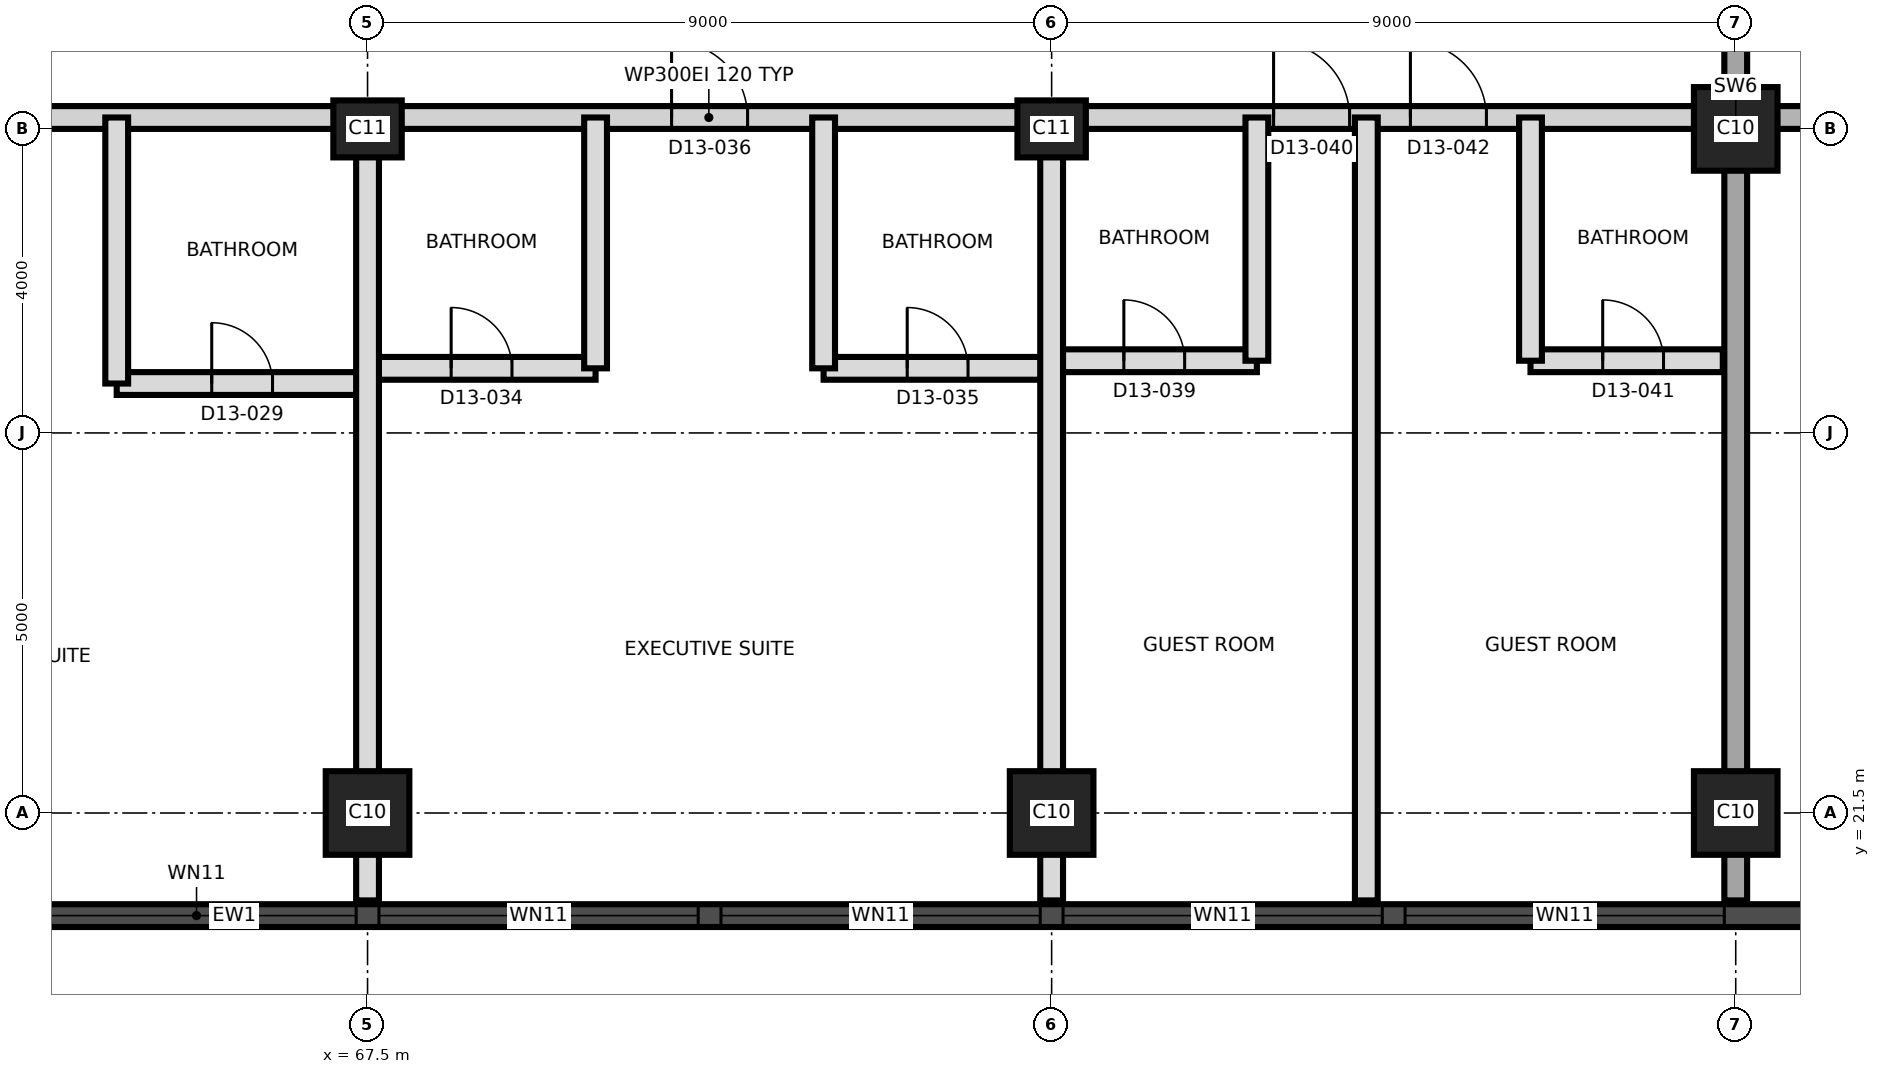
"""IFC4 building model, lengths in metres.
Left out: names, types, materials, properties, quantities, classifications, styles, units other than length and angle.
Written with IfcOpenShell. Run it as: python <this file> out.ifc"""

import sys

from ifc_helpers import new_model, si_unit, direction, frame, frame_2d, origin, origin_2d, place, context, subcontext, project, spatial, rectangle, extrude, element, fill, save


model = new_model("IFC4")
c1 = context("Model", 3, precision=1e-05, world=origin(), true_north=direction((0.0, 1.0)))
c2 = subcontext(c1, "Body", "Model", "MODEL_VIEW")
j1 = project(units=[si_unit("LENGTHUNIT", "METRE"), si_unit("PLANEANGLEUNIT", "RADIAN")], contexts=[c1])
p1 = place(None, origin())
s1 = spatial("IfcSite", under=j1, at=p1, CompositionType="ELEMENT")
p2 = place(p1, origin())
s2 = spatial("IfcBuilding", under=s1, at=p2, CompositionType="ELEMENT")
p3 = place(p2, frame((0.0, 0.0, 142.2)))
s3 = spatial("IfcBuildingStorey", under=s2, at=p3, CompositionType="ELEMENT", Elevation=142.2)
for number, where, z_axis, x_axis in (
    (1, (67.5, 21.5, 0.0), (0.0, 0.0, 1.0), (1.0, 0.0, 0.0)),
    (2, (76.5, 21.5, 0.0), (0.0, 0.0, 1.0), (1.0, 0.0, 0.0)),
    (3, (85.5, 21.5, 0.0), (0.0, 0.0, 1.0), (1.0, 0.0, 0.0)),
):
    element("IfcColumn", number, at=place(p3, frame(where, z_axis=z_axis, x_axis=x_axis)), inside=s3, PredefinedType="COLUMN", context=c2, shape_type="SweptSolid", body=[
        extrude(rectangle(XDim=1.1, YDim=1.1, at=origin_2d()), origin(), (0.0, 0.0, 1.0), 3.7),
    ])
for number, where, z_axis, x_axis in (
    (4, (67.5, 30.5, 0.0), (0.0, 0.0, 1.0), (1.0, 0.0, 0.0)),
    (5, (76.5, 30.5, 0.0), (0.0, 0.0, 1.0), (1.0, 0.0, 0.0)),
):
    element("IfcColumn", number, at=place(p3, frame(where, z_axis=z_axis, x_axis=x_axis)), inside=s3, PredefinedType="COLUMN", context=c2, shape_type="SweptSolid", body=[
        extrude(rectangle(XDim=0.9, YDim=0.75, at=origin_2d()), origin(), (0.0, 0.0, 1.0), 3.7),
    ])
p4 = place(p3, frame((85.5, 30.5, 0.0), z_axis=(0.0, 0.0, 1.0), x_axis=(1.0, 0.0, 0.0)))
e6 = element("IfcColumn", 6, at=p4, inside=s3, PredefinedType="COLUMN", context=c2, shape_type="SweptSolid", body=[
    extrude(rectangle(XDim=1.1, YDim=1.1, at=origin_2d()), origin(), (0.0, 0.0, 1.0), 3.7),
])
p5 = place(p3, frame((85.5, 20.35, 0.0), z_axis=(0.0, 0.0, 1.0), x_axis=(0.0, 1.0, 0.0)))
e7 = element("IfcWall", 7, at=p5, inside=s3, PredefinedType="SHEAR", context=c2, shape_type="SweptSolid", body=[
    extrude(rectangle(XDim=20.3, YDim=0.3, at=frame_2d((10.15, 0.0))), origin(), (0.0, 0.0, 1.0), 3.7),
])
p6 = place(p5, frame((11.35, 0.0, 0.0)))
e8 = element("IfcOpeningElement", 8, at=p6, cuts=e7, PredefinedType="OPENING", context=c2, shape_type="SweptSolid", body=[
    extrude(rectangle(XDim=1.4, YDim=2.1, at=frame_2d((0.7, 1.05))), frame((0.0, 0.16, 0.0), z_axis=(0.0, -1.0, 0.0), x_axis=(1.0, 0.0, 0.0)), (0.0, 0.0, 1.0), 0.32),
])
p7 = place(p3, frame((44.011, 20.15, 0.0), z_axis=(0.0, 0.0, 1.0), x_axis=(1.0, 0.0, 0.0)))
e9 = element("IfcWall", 9, at=p7, inside=s3, PredefinedType="SOLIDWALL", context=c2, shape_type="SweptSolid", body=[
    extrude(rectangle(XDim=43.476, YDim=0.3, at=frame_2d((21.738, 0.0))), origin(), (0.0, 0.0, 1.0), 3.4),
])
p8 = place(p7, frame((1.845, 0.0, 0.3)))
e10 = element("IfcOpeningElement", 10, at=p8, cuts=e9, PredefinedType="OPENING", context=c2, shape_type="SweptSolid", body=[
    extrude(rectangle(XDim=1.8, YDim=2.4, at=frame_2d((0.9, 1.2))), frame((0.0, 0.16, 0.0), z_axis=(0.0, -1.0, 0.0), x_axis=(1.0, 0.0, 0.0)), (0.0, 0.0, 1.0), 0.32),
])
p9 = place(p7, frame((5.639, 0.0, 0.9)))
e11 = element("IfcOpeningElement", 11, at=p9, cuts=e9, PredefinedType="OPENING", context=c2, shape_type="SweptSolid", body=[
    extrude(rectangle(XDim=4.2, YDim=1.5, at=frame_2d((2.1, 0.75))), frame((0.0, 0.16, 0.0), z_axis=(0.0, -1.0, 0.0), x_axis=(1.0, 0.0, 0.0)), (0.0, 0.0, 1.0), 0.32),
])
p10 = place(p7, frame((10.139, 0.0, 0.9)))
e12 = element("IfcOpeningElement", 12, at=p10, cuts=e9, PredefinedType="OPENING", context=c2, shape_type="SweptSolid", body=[
    extrude(rectangle(XDim=4.2, YDim=1.5, at=frame_2d((2.1, 0.75))), frame((0.0, 0.16, 0.0), z_axis=(0.0, -1.0, 0.0), x_axis=(1.0, 0.0, 0.0)), (0.0, 0.0, 1.0), 0.32),
])
p11 = place(p7, frame((14.639, 0.0, 0.9)))
e13 = element("IfcOpeningElement", 13, at=p11, cuts=e9, PredefinedType="OPENING", context=c2, shape_type="SweptSolid", body=[
    extrude(rectangle(XDim=4.2, YDim=1.5, at=frame_2d((2.1, 0.75))), frame((0.0, 0.16, 0.0), z_axis=(0.0, -1.0, 0.0), x_axis=(1.0, 0.0, 0.0)), (0.0, 0.0, 1.0), 0.32),
])
p12 = place(p7, frame((19.139, 0.0, 0.9)))
e14 = element("IfcOpeningElement", 14, at=p12, cuts=e9, PredefinedType="OPENING", context=c2, shape_type="SweptSolid", body=[
    extrude(rectangle(XDim=4.2, YDim=1.5, at=frame_2d((2.1, 0.75))), frame((0.0, 0.16, 0.0), z_axis=(0.0, -1.0, 0.0), x_axis=(1.0, 0.0, 0.0)), (0.0, 0.0, 1.0), 0.32),
])
p13 = place(p7, frame((23.639, 0.0, 0.9)))
e15 = element("IfcOpeningElement", 15, at=p13, cuts=e9, PredefinedType="OPENING", context=c2, shape_type="SweptSolid", body=[
    extrude(rectangle(XDim=4.2, YDim=1.5, at=frame_2d((2.1, 0.75))), frame((0.0, 0.16, 0.0), z_axis=(0.0, -1.0, 0.0), x_axis=(1.0, 0.0, 0.0)), (0.0, 0.0, 1.0), 0.32),
])
p14 = place(p7, frame((28.139, 0.0, 0.9)))
e16 = element("IfcOpeningElement", 16, at=p14, cuts=e9, PredefinedType="OPENING", context=c2, shape_type="SweptSolid", body=[
    extrude(rectangle(XDim=4.2, YDim=1.5, at=frame_2d((2.1, 0.75))), frame((0.0, 0.16, 0.0), z_axis=(0.0, -1.0, 0.0), x_axis=(1.0, 0.0, 0.0)), (0.0, 0.0, 1.0), 0.32),
])
p15 = place(p7, frame((32.639, 0.0, 0.9)))
e17 = element("IfcOpeningElement", 17, at=p15, cuts=e9, PredefinedType="OPENING", context=c2, shape_type="SweptSolid", body=[
    extrude(rectangle(XDim=4.2, YDim=1.5, at=frame_2d((2.1, 0.75))), frame((0.0, 0.16, 0.0), z_axis=(0.0, -1.0, 0.0), x_axis=(1.0, 0.0, 0.0)), (0.0, 0.0, 1.0), 0.32),
])
p16 = place(p7, frame((37.139, 0.0, 0.9)))
e18 = element("IfcOpeningElement", 18, at=p16, cuts=e9, PredefinedType="OPENING", context=c2, shape_type="SweptSolid", body=[
    extrude(rectangle(XDim=4.2, YDim=1.5, at=frame_2d((2.1, 0.75))), frame((0.0, 0.16, 0.0), z_axis=(0.0, -1.0, 0.0), x_axis=(1.0, 0.0, 0.0)), (0.0, 0.0, 1.0), 0.32),
])
p17 = place(p3, frame((64.2, 27.15, 0.0), z_axis=(0.0, 0.0, 1.0), x_axis=(1.0, 0.0, 0.0)))
e19 = element("IfcWall", 19, at=p17, inside=s3, PredefinedType="PARTITIONING", context=c2, shape_type="SweptSolid", body=[
    extrude(rectangle(XDim=3.3, YDim=0.3, at=frame_2d((1.65, 0.0))), origin(), (0.0, 0.0, 1.0), 3.4),
])
p18 = place(p17, frame((1.25, 0.0, 0.0)))
e20 = element("IfcOpeningElement", 20, at=p18, cuts=e19, PredefinedType="OPENING", context=c2, shape_type="SweptSolid", body=[
    extrude(rectangle(XDim=0.8, YDim=2.1, at=frame_2d((0.4, 1.05))), frame((0.0, 0.16, 0.0), z_axis=(0.0, -1.0, 0.0), x_axis=(1.0, 0.0, 0.0)), (0.0, 0.0, 1.0), 0.32),
])
p19 = place(p3, frame((67.5, 27.35, 0.0), z_axis=(0.0, 0.0, 1.0), x_axis=(1.0, 0.0, 0.0)))
e21 = element("IfcWall", 21, at=p19, inside=s3, PredefinedType="PARTITIONING", context=c2, shape_type="SweptSolid", body=[
    extrude(rectangle(XDim=3.0, YDim=0.3, at=frame_2d((1.5, 0.0))), origin(), (0.0, 0.0, 1.0), 3.4),
])
p20 = place(p19, frame((1.1, 0.0, 0.0)))
e22 = element("IfcOpeningElement", 22, at=p20, cuts=e21, PredefinedType="OPENING", context=c2, shape_type="SweptSolid", body=[
    extrude(rectangle(XDim=0.8, YDim=2.1, at=frame_2d((0.4, 1.05))), frame((0.0, 0.16, 0.0), z_axis=(0.0, -1.0, 0.0), x_axis=(1.0, 0.0, 0.0)), (0.0, 0.0, 1.0), 0.32),
])
p21 = place(p3, frame((73.5, 27.35, 0.0), z_axis=(0.0, 0.0, 1.0), x_axis=(1.0, 0.0, 0.0)))
e23 = element("IfcWall", 23, at=p21, inside=s3, PredefinedType="PARTITIONING", context=c2, shape_type="SweptSolid", body=[
    extrude(rectangle(XDim=3.0, YDim=0.3, at=frame_2d((1.5, 0.0))), origin(), (0.0, 0.0, 1.0), 3.4),
])
p22 = place(p21, frame((1.1, 0.0, 0.0)))
e24 = element("IfcOpeningElement", 24, at=p22, cuts=e23, PredefinedType="OPENING", context=c2, shape_type="SweptSolid", body=[
    extrude(rectangle(XDim=0.8, YDim=2.1, at=frame_2d((0.4, 1.05))), frame((0.0, 0.16, 0.0), z_axis=(0.0, -1.0, 0.0), x_axis=(1.0, 0.0, 0.0)), (0.0, 0.0, 1.0), 0.32),
])
p23 = place(p3, frame((76.5, 27.45, 0.0), z_axis=(0.0, 0.0, 1.0), x_axis=(1.0, 0.0, 0.0)))
e25 = element("IfcWall", 25, at=p23, inside=s3, PredefinedType="PARTITIONING", context=c2, shape_type="SweptSolid", body=[
    extrude(rectangle(XDim=2.7, YDim=0.3, at=frame_2d((1.35, 0.0))), origin(), (0.0, 0.0, 1.0), 3.4),
])
p24 = place(p23, frame((0.95, 0.0, 0.0)))
e26 = element("IfcOpeningElement", 26, at=p24, cuts=e25, PredefinedType="OPENING", context=c2, shape_type="SweptSolid", body=[
    extrude(rectangle(XDim=0.8, YDim=2.1, at=frame_2d((0.4, 1.05))), frame((0.0, 0.16, 0.0), z_axis=(0.0, -1.0, 0.0), x_axis=(1.0, 0.0, 0.0)), (0.0, 0.0, 1.0), 0.32),
])
p25 = place(p3, frame((82.8, 27.45, 0.0), z_axis=(0.0, 0.0, 1.0), x_axis=(1.0, 0.0, 0.0)))
e27 = element("IfcWall", 27, at=p25, inside=s3, PredefinedType="PARTITIONING", context=c2, shape_type="SweptSolid", body=[
    extrude(rectangle(XDim=2.53, YDim=0.3, at=frame_2d((1.265, 0.0))), origin(), (0.0, 0.0, 1.0), 3.4),
])
p26 = place(p25, frame((0.95, 0.0, 0.0)))
e28 = element("IfcOpeningElement", 28, at=p26, cuts=e27, PredefinedType="OPENING", context=c2, shape_type="SweptSolid", body=[
    extrude(rectangle(XDim=0.8, YDim=2.1, at=frame_2d((0.4, 1.05))), frame((0.0, 0.16, 0.0), z_axis=(0.0, -1.0, 0.0), x_axis=(1.0, 0.0, 0.0)), (0.0, 0.0, 1.0), 0.32),
])
p27 = place(p3, frame((58.65, 30.65, 0.0), z_axis=(0.0, 0.0, 1.0), x_axis=(1.0, 0.0, 0.0)))
e29 = element("IfcWall", 29, at=p27, inside=s3, PredefinedType="PARTITIONING", context=c2, shape_type="SweptSolid", body=[
    extrude(rectangle(XDim=26.68, YDim=0.3, at=frame_2d((13.34, 0.0))), origin(), (0.0, 0.0, 1.0), 3.4),
])
p28 = place(p27, frame((2.2, 0.0, 0.0)))
e30 = element("IfcOpeningElement", 30, at=p28, cuts=e29, PredefinedType="OPENING", context=c2, shape_type="SweptSolid", body=[
    extrude(rectangle(XDim=1.0, YDim=2.4, at=frame_2d((0.5, 1.2))), frame((0.0, 0.16, 0.0), z_axis=(0.0, -1.0, 0.0), x_axis=(1.0, 0.0, 0.0)), (0.0, 0.0, 1.0), 0.32),
])
p29 = place(p27, frame((12.85, 0.0, 0.0)))
e31 = element("IfcOpeningElement", 31, at=p29, cuts=e29, PredefinedType="OPENING", context=c2, shape_type="SweptSolid", body=[
    extrude(rectangle(XDim=1.0, YDim=2.4, at=frame_2d((0.5, 1.2))), frame((0.0, 0.16, 0.0), z_axis=(0.0, -1.0, 0.0), x_axis=(1.0, 0.0, 0.0)), (0.0, 0.0, 1.0), 0.32),
])
p30 = place(p27, frame((20.77, 0.0, 0.0)))
e32 = element("IfcOpeningElement", 32, at=p30, cuts=e29, PredefinedType="OPENING", context=c2, shape_type="SweptSolid", body=[
    extrude(rectangle(XDim=1.0, YDim=2.1, at=frame_2d((0.5, 1.05))), frame((0.0, 0.16, 0.0), z_axis=(0.0, -1.0, 0.0), x_axis=(1.0, 0.0, 0.0)), (0.0, 0.0, 1.0), 0.32),
])
p31 = place(p27, frame((22.57, 0.0, 0.0)))
e33 = element("IfcOpeningElement", 33, at=p31, cuts=e29, PredefinedType="OPENING", context=c2, shape_type="SweptSolid", body=[
    extrude(rectangle(XDim=1.0, YDim=2.1, at=frame_2d((0.5, 1.05))), frame((0.0, 0.16, 0.0), z_axis=(0.0, -1.0, 0.0), x_axis=(1.0, 0.0, 0.0)), (0.0, 0.0, 1.0), 0.32),
])
p32 = place(p3, frame((85.67, 30.65, 0.0), z_axis=(0.0, 0.0, 1.0), x_axis=(1.0, 0.0, 0.0)))
e34 = element("IfcWall", 34, at=p32, inside=s3, PredefinedType="SHEAR", context=c2, shape_type="SweptSolid", body=[
    extrude(rectangle(XDim=9.58, YDim=0.3, at=frame_2d((4.79, 0.0))), origin(), (0.0, 0.0, 1.0), 3.4),
])
p33 = place(p32, frame((2.08, 0.0, 0.0)))
e35 = element("IfcOpeningElement", 35, at=p33, cuts=e34, PredefinedType="OPENING", context=c2, shape_type="SweptSolid", body=[
    extrude(rectangle(XDim=1.2, YDim=2.1, at=frame_2d((0.6, 1.05))), frame((0.0, 0.16, 0.0), z_axis=(0.0, -1.0, 0.0), x_axis=(1.0, 0.0, 0.0)), (0.0, 0.0, 1.0), 0.32),
])
p34 = place(p32, frame((5.63, 0.0, 0.0)))
e36 = element("IfcOpeningElement", 36, at=p34, cuts=e34, PredefinedType="OPENING", context=c2, shape_type="SweptSolid", body=[
    extrude(rectangle(XDim=1.0, YDim=2.1, at=frame_2d((0.5, 1.05))), frame((0.0, 0.16, 0.0), z_axis=(0.0, -1.0, 0.0), x_axis=(1.0, 0.0, 0.0)), (0.0, 0.0, 1.0), 0.32),
])
p35 = place(p3, frame((64.2, 27.15, 0.0), z_axis=(0.0, 0.0, 1.0), x_axis=(0.0, 1.0, 0.0)))
e37 = element("IfcWall", 37, at=p35, inside=s3, PredefinedType="PARTITIONING", context=c2, shape_type="SweptSolid", body=[
    extrude(rectangle(XDim=3.5, YDim=0.3, at=frame_2d((1.75, 0.0))), origin(), (0.0, 0.0, 1.0), 3.4),
])
p36 = place(p3, frame((67.5, 20.35, 0.0), z_axis=(0.0, 0.0, 1.0), x_axis=(0.0, 1.0, 0.0)))
e38 = element("IfcWall", 38, at=p36, inside=s3, PredefinedType="PARTITIONING", context=c2, shape_type="SweptSolid", body=[
    extrude(rectangle(XDim=10.3, YDim=0.3, at=frame_2d((5.15, 0.0))), origin(), (0.0, 0.0, 1.0), 3.4),
])
for number, where, z_axis, x_axis in (
    (39, (70.5, 27.35, 0.0), (0.0, 0.0, 1.0), (0.0, 1.0, 0.0)),
    (40, (73.5, 27.35, 0.0), (0.0, 0.0, 1.0), (0.0, 1.0, 0.0)),
):
    element("IfcWall", number, at=place(p3, frame(where, z_axis=z_axis, x_axis=x_axis)), inside=s3, PredefinedType="PARTITIONING", context=c2, shape_type="SweptSolid", body=[
        extrude(rectangle(XDim=3.3, YDim=0.3, at=frame_2d((1.65, 0.0))), origin(), (0.0, 0.0, 1.0), 3.4),
    ])
p37 = place(p3, frame((76.5, 20.35, 0.0), z_axis=(0.0, 0.0, 1.0), x_axis=(0.0, 1.0, 0.0)))
e41 = element("IfcWall", 41, at=p37, inside=s3, PredefinedType="PARTITIONING", context=c2, shape_type="SweptSolid", body=[
    extrude(rectangle(XDim=10.3, YDim=0.3, at=frame_2d((5.15, 0.0))), origin(), (0.0, 0.0, 1.0), 3.4),
])
p38 = place(p3, frame((79.2, 27.45, 0.0), z_axis=(0.0, 0.0, 1.0), x_axis=(0.0, 1.0, 0.0)))
e42 = element("IfcWall", 42, at=p38, inside=s3, PredefinedType="PARTITIONING", context=c2, shape_type="SweptSolid", body=[
    extrude(rectangle(XDim=3.2, YDim=0.3, at=frame_2d((1.6, 0.0))), origin(), (0.0, 0.0, 1.0), 3.4),
])
p39 = place(p3, frame((80.64, 20.35, 0.0), z_axis=(0.0, 0.0, 1.0), x_axis=(0.0, 1.0, 0.0)))
e43 = element("IfcWall", 43, at=p39, inside=s3, PredefinedType="PARTITIONING", context=c2, shape_type="SweptSolid", body=[
    extrude(rectangle(XDim=10.3, YDim=0.3, at=frame_2d((5.15, 0.0))), origin(), (0.0, 0.0, 1.0), 3.4),
])
p40 = place(p3, frame((82.8, 27.45, 0.0), z_axis=(0.0, 0.0, 1.0), x_axis=(0.0, 1.0, 0.0)))
e44 = element("IfcWall", 44, at=p40, inside=s3, PredefinedType="PARTITIONING", context=c2, shape_type="SweptSolid", body=[
    extrude(rectangle(XDim=3.2, YDim=0.3, at=frame_2d((1.6, 0.0))), origin(), (0.0, 0.0, 1.0), 3.4),
])
p41 = place(p12, origin())
e45 = element("IfcWindow", 45, at=p41, inside=s3, PartitioningType="SINGLE_PANEL", PredefinedType="WINDOW", context=c2, shape_type="SweptSolid", body=[
    extrude(rectangle(XDim=4.2, YDim=1.5, at=frame_2d((2.1, 0.75))), frame((0.0, 0.03, 0.0), z_axis=(0.0, -1.0, 0.0), x_axis=(1.0, 0.0, 0.0)), (0.0, 0.0, 1.0), 0.06),
])
fill(e14, e45)
p42 = place(p13, origin())
e46 = element("IfcWindow", 46, at=p42, inside=s3, PartitioningType="SINGLE_PANEL", PredefinedType="WINDOW", context=c2, shape_type="SweptSolid", body=[
    extrude(rectangle(XDim=4.2, YDim=1.5, at=frame_2d((2.1, 0.75))), frame((0.0, 0.03, 0.0), z_axis=(0.0, -1.0, 0.0), x_axis=(1.0, 0.0, 0.0)), (0.0, 0.0, 1.0), 0.06),
])
fill(e15, e46)
p43 = place(p14, origin())
e47 = element("IfcWindow", 47, at=p43, inside=s3, PartitioningType="SINGLE_PANEL", PredefinedType="WINDOW", context=c2, shape_type="SweptSolid", body=[
    extrude(rectangle(XDim=4.2, YDim=1.5, at=frame_2d((2.1, 0.75))), frame((0.0, 0.03, 0.0), z_axis=(0.0, -1.0, 0.0), x_axis=(1.0, 0.0, 0.0)), (0.0, 0.0, 1.0), 0.06),
])
fill(e16, e47)
p44 = place(p15, origin())
e48 = element("IfcWindow", 48, at=p44, inside=s3, PartitioningType="SINGLE_PANEL", PredefinedType="WINDOW", context=c2, shape_type="SweptSolid", body=[
    extrude(rectangle(XDim=4.2, YDim=1.5, at=frame_2d((2.1, 0.75))), frame((0.0, 0.03, 0.0), z_axis=(0.0, -1.0, 0.0), x_axis=(1.0, 0.0, 0.0)), (0.0, 0.0, 1.0), 0.06),
])
fill(e17, e48)
p45 = place(p16, origin())
e49 = element("IfcWindow", 49, at=p45, inside=s3, PartitioningType="SINGLE_PANEL", PredefinedType="WINDOW", context=c2, shape_type="SweptSolid", body=[
    extrude(rectangle(XDim=4.2, YDim=1.5, at=frame_2d((2.1, 0.75))), frame((0.0, 0.03, 0.0), z_axis=(0.0, -1.0, 0.0), x_axis=(1.0, 0.0, 0.0)), (0.0, 0.0, 1.0), 0.06),
])
fill(e18, e49)
p46 = place(p18, origin())
e50 = element("IfcDoor", 50, at=p46, inside=s3, OperationType="SINGLE_SWING_LEFT", PredefinedType="DOOR", context=c2, shape_type="SweptSolid", body=[
    extrude(rectangle(XDim=0.8, YDim=2.1, at=frame_2d((0.4, 1.05))), frame((0.0, 0.025, 0.0), z_axis=(0.0, -1.0, 0.0), x_axis=(1.0, 0.0, 0.0)), (0.0, 0.0, 1.0), 0.05),
])
fill(e20, e50)
p47 = place(p20, origin())
e51 = element("IfcDoor", 51, at=p47, inside=s3, OperationType="SINGLE_SWING_LEFT", PredefinedType="DOOR", context=c2, shape_type="SweptSolid", body=[
    extrude(rectangle(XDim=0.8, YDim=2.1, at=frame_2d((0.4, 1.05))), frame((0.0, 0.025, 0.0), z_axis=(0.0, -1.0, 0.0), x_axis=(1.0, 0.0, 0.0)), (0.0, 0.0, 1.0), 0.05),
])
fill(e22, e51)
p48 = place(p22, origin())
e52 = element("IfcDoor", 52, at=p48, inside=s3, OperationType="SINGLE_SWING_LEFT", PredefinedType="DOOR", context=c2, shape_type="SweptSolid", body=[
    extrude(rectangle(XDim=0.8, YDim=2.1, at=frame_2d((0.4, 1.05))), frame((0.0, 0.025, 0.0), z_axis=(0.0, -1.0, 0.0), x_axis=(1.0, 0.0, 0.0)), (0.0, 0.0, 1.0), 0.05),
])
fill(e24, e52)
p49 = place(p29, origin())
e53 = element("IfcDoor", 53, at=p49, inside=s3, OperationType="SINGLE_SWING_RIGHT", PredefinedType="DOOR", context=c2, shape_type="SweptSolid", body=[
    extrude(rectangle(XDim=1.0, YDim=2.4, at=frame_2d((0.5, 1.2))), frame((0.0, 0.025, 0.0), z_axis=(0.0, -1.0, 0.0), x_axis=(1.0, 0.0, 0.0)), (0.0, 0.0, 1.0), 0.05),
])
fill(e31, e53)
p50 = place(p24, origin())
e54 = element("IfcDoor", 54, at=p50, inside=s3, OperationType="SINGLE_SWING_RIGHT", PredefinedType="DOOR", context=c2, shape_type="SweptSolid", body=[
    extrude(rectangle(XDim=0.8, YDim=2.1, at=frame_2d((0.4, 1.05))), frame((0.0, 0.025, 0.0), z_axis=(0.0, -1.0, 0.0), x_axis=(1.0, 0.0, 0.0)), (0.0, 0.0, 1.0), 0.05),
])
fill(e26, e54)
p51 = place(p30, origin())
e55 = element("IfcDoor", 55, at=p51, inside=s3, OperationType="SINGLE_SWING_LEFT", PredefinedType="DOOR", context=c2, shape_type="SweptSolid", body=[
    extrude(rectangle(XDim=1.0, YDim=2.1, at=frame_2d((0.5, 1.05))), frame((0.0, 0.025, 0.0), z_axis=(0.0, -1.0, 0.0), x_axis=(1.0, 0.0, 0.0)), (0.0, 0.0, 1.0), 0.05),
])
fill(e32, e55)
p52 = place(p26, origin())
e56 = element("IfcDoor", 56, at=p52, inside=s3, OperationType="SINGLE_SWING_LEFT", PredefinedType="DOOR", context=c2, shape_type="SweptSolid", body=[
    extrude(rectangle(XDim=0.8, YDim=2.1, at=frame_2d((0.4, 1.05))), frame((0.0, 0.025, 0.0), z_axis=(0.0, -1.0, 0.0), x_axis=(1.0, 0.0, 0.0)), (0.0, 0.0, 1.0), 0.05),
])
fill(e28, e56)
p53 = place(p31, origin())
e57 = element("IfcDoor", 57, at=p53, inside=s3, OperationType="SINGLE_SWING_LEFT", PredefinedType="DOOR", context=c2, shape_type="SweptSolid", body=[
    extrude(rectangle(XDim=1.0, YDim=2.1, at=frame_2d((0.5, 1.05))), frame((0.0, 0.025, 0.0), z_axis=(0.0, -1.0, 0.0), x_axis=(1.0, 0.0, 0.0)), (0.0, 0.0, 1.0), 0.05),
])
fill(e33, e57)
save(model, sys.argv[1])
